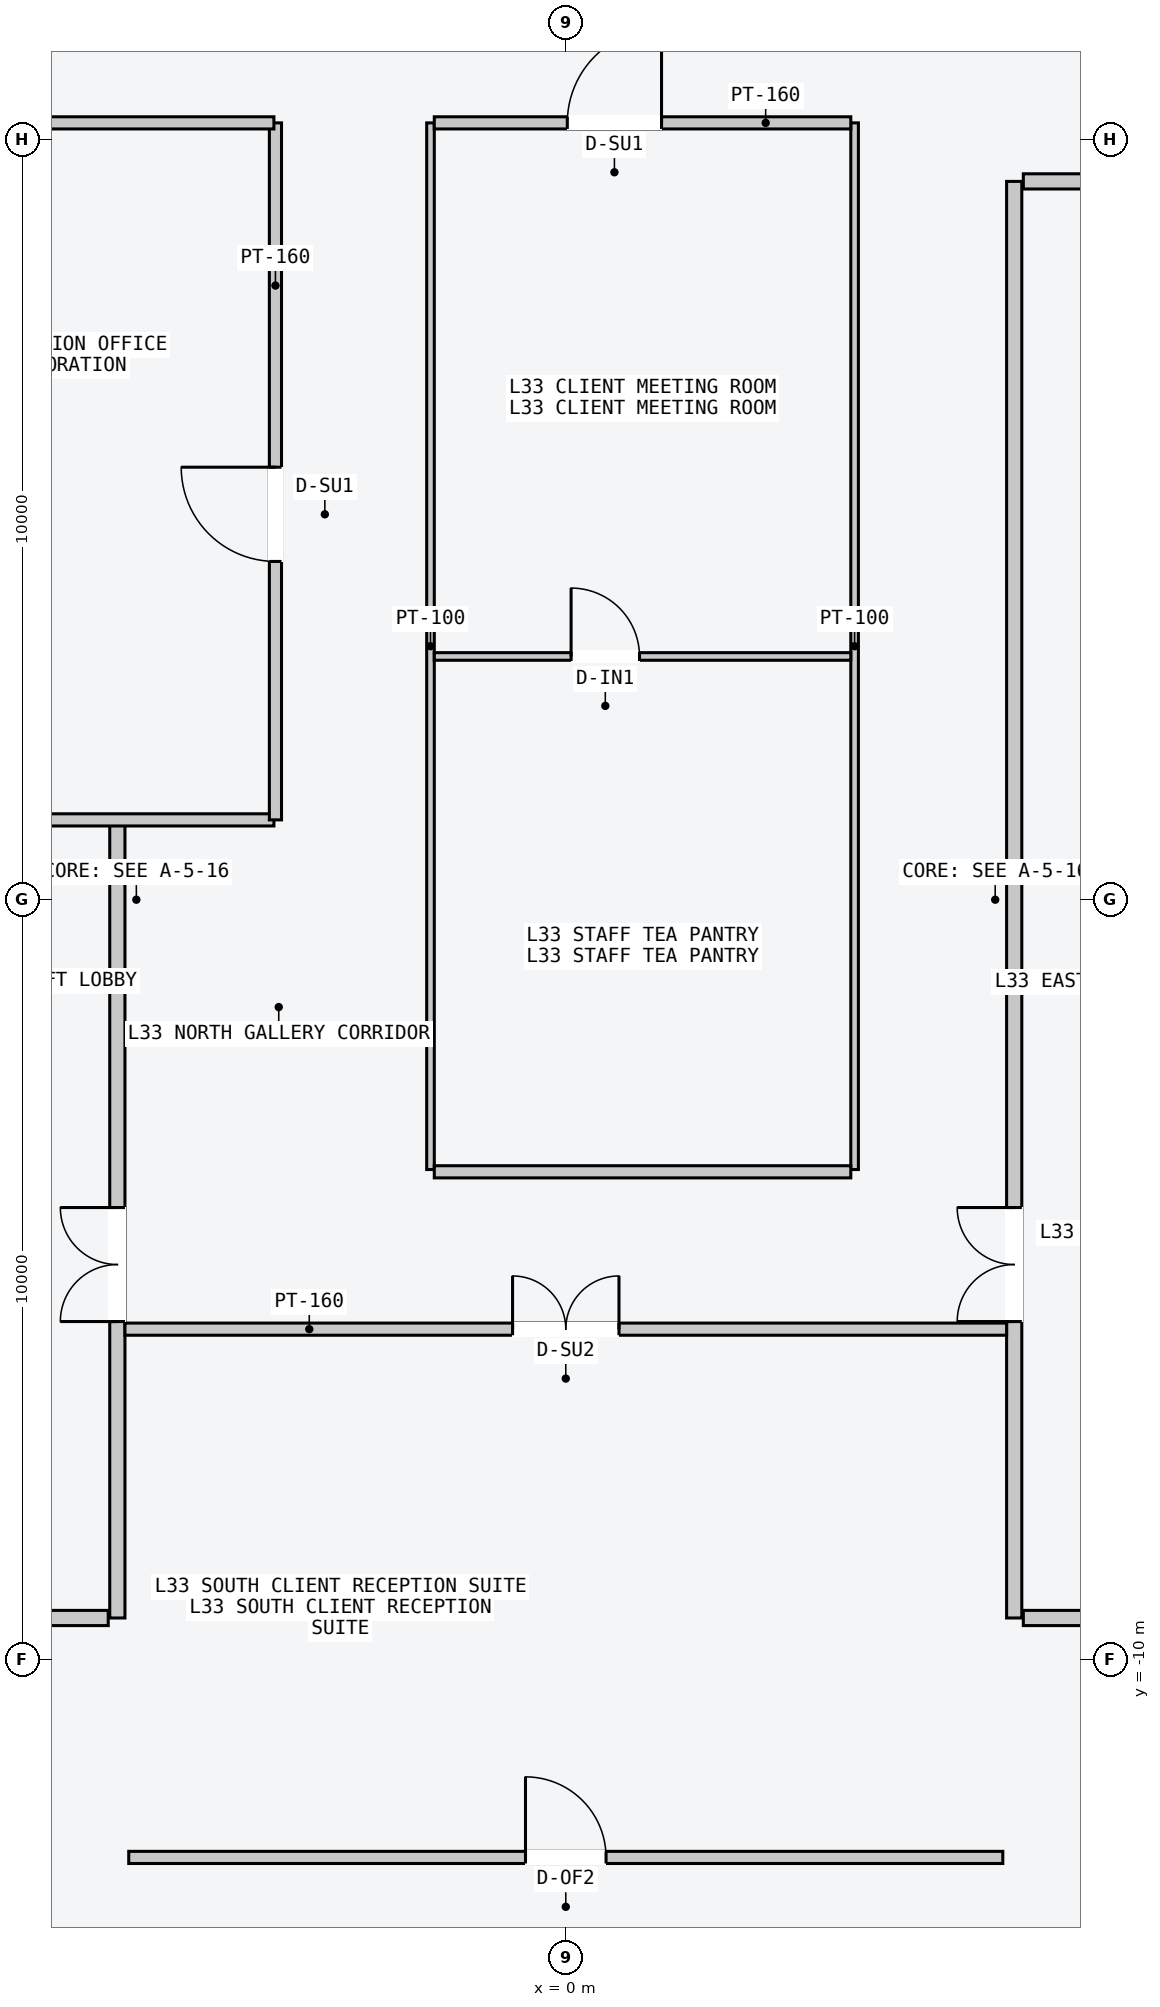
"""IFC4 building model, lengths in metres.
Left out: names, types, materials, properties, quantities, classifications, styles, units other than length and angle.
Written with IfcOpenShell. Run it as: python <this file> out.ifc"""

import sys

from ifc_helpers import new_model, si_unit, direction, frame, frame_2d, origin, place, context, subcontext, project, spatial, rectangle, extrude, element, fill, save


model = new_model("IFC4")
c1 = context("Model", 3, precision=1e-05, world=origin(), true_north=direction((0.0, 1.0)))
c2 = subcontext(c1, "Body", "Model", "MODEL_VIEW")
j1 = project(units=[si_unit("LENGTHUNIT", "METRE"), si_unit("PLANEANGLEUNIT", "RADIAN")], contexts=[c1])
p1 = place(None, origin())
s1 = spatial("IfcSite", under=j1, at=p1, CompositionType="ELEMENT")
p2 = place(p1, origin())
s2 = spatial("IfcBuilding", under=s1, at=p2, CompositionType="ELEMENT")
p3 = place(p2, frame((0.0, 0.0, 127.8)))
s3 = spatial("IfcBuildingStorey", under=s2, at=p3, CompositionType="ELEMENT", Elevation=127.8)
p4 = place(p3, frame((-5.9, -9.45, 0.0), z_axis=(0.0, 0.0, 1.0), x_axis=(0.0, 1.0, 0.0)))
e1 = element("IfcWall", 1, at=p4, inside=s3, PredefinedType="PARTITIONING", context=c2, shape_type="SweptSolid", body=[
    extrude(rectangle(XDim=10.5, YDim=0.2, at=frame_2d((5.25, 0.0))), origin(), (0.0, 0.0, 1.0), 3.4),
])
p5 = place(p4, frame((3.9, 0.0, 0.0)))
e2 = element("IfcOpeningElement", 2, at=p5, cuts=e1, PredefinedType="OPENING", context=c2, shape_type="SweptSolid", body=[
    extrude(rectangle(XDim=1.5, YDim=2.2, at=frame_2d((0.75, 1.1))), frame((0.0, 0.11, 0.0), z_axis=(0.0, -1.0, 0.0), x_axis=(1.0, 0.0, 0.0)), (0.0, 0.0, 1.0), 0.22),
])
p6 = place(p3, frame((-6.02, -9.45, 0.0), z_axis=(0.0, 0.0, 1.0), x_axis=(-1.0, 0.0, 0.0)))
e3 = element("IfcWall", 3, at=p6, inside=s3, PredefinedType="PARTITIONING", context=c2, shape_type="SweptSolid", body=[
    extrude(rectangle(XDim=1.8, YDim=0.2, at=frame_2d((0.9, 0.0))), origin(), (0.0, 0.0, 1.0), 3.4),
])
p7 = place(p3, frame((5.9, -9.45, 0.0), z_axis=(0.0, 0.0, 1.0), x_axis=(0.0, 1.0, 0.0)))
e4 = element("IfcWall", 4, at=p7, inside=s3, PredefinedType="PARTITIONING", context=c2, shape_type="SweptSolid", body=[
    extrude(rectangle(XDim=18.9, YDim=0.2, at=frame_2d((9.45, 0.0))), origin(), (0.0, 0.0, 1.0), 3.4),
])
p8 = place(p7, frame((3.9, 0.0, 0.0)))
e5 = element("IfcOpeningElement", 5, at=p8, cuts=e4, PredefinedType="OPENING", context=c2, shape_type="SweptSolid", body=[
    extrude(rectangle(XDim=1.5, YDim=2.2, at=frame_2d((0.75, 1.1))), frame((0.0, 0.11, 0.0), z_axis=(0.0, -1.0, 0.0), x_axis=(1.0, 0.0, 0.0)), (0.0, 0.0, 1.0), 0.22),
])
for number, where, z_axis, x_axis in (
    (6, (6.02, -9.45, 0.0), (0.0, 0.0, 1.0), (1.0, 0.0, 0.0)),
    (7, (6.02, 9.45, 0.0), (0.0, 0.0, 1.0), (1.0, 0.0, 0.0)),
):
    element("IfcWall", number, at=place(p3, frame(where, z_axis=z_axis, x_axis=x_axis)), inside=s3, PredefinedType="PARTITIONING", context=c2, shape_type="SweptSolid", body=[
        extrude(rectangle(XDim=1.8, YDim=0.2, at=frame_2d((0.9, 0.0))), origin(), (0.0, 0.0, 1.0), 3.4),
    ])
p9 = place(p3, frame((-10.05, 1.05, 0.0), z_axis=(0.0, 0.0, 1.0), x_axis=(1.0, 0.0, 0.0)))
e8 = element("IfcWall", 8, at=p9, inside=s3, PredefinedType="PARTITIONING", context=c2, shape_type="SweptSolid", body=[
    extrude(rectangle(XDim=6.21, YDim=0.16, at=frame_2d((3.105, 0.0))), origin(), (0.0, 0.0, 1.0), 3.4),
])
p10 = place(p3, frame((-3.82, 1.05, 0.0), z_axis=(0.0, 0.0, 1.0), x_axis=(0.0, 1.0, 0.0)))
e9 = element("IfcWall", 9, at=p10, inside=s3, PredefinedType="PARTITIONING", context=c2, shape_type="SweptSolid", body=[
    extrude(rectangle(XDim=9.17, YDim=0.16, at=frame_2d((4.585, 0.0))), origin(), (0.0, 0.0, 1.0), 3.4),
])
p11 = place(p10, frame((3.4, 0.0, 0.0)))
e10 = element("IfcOpeningElement", 10, at=p11, cuts=e9, PredefinedType="OPENING", context=c2, shape_type="SweptSolid", body=[
    extrude(rectangle(XDim=1.24, YDim=2.24, at=frame_2d((0.62, 1.12))), frame((0.0, 0.09, 0.0), z_axis=(0.0, -1.0, 0.0), x_axis=(1.0, 0.0, 0.0)), (0.0, 0.0, 1.0), 0.18),
])
p12 = place(p3, frame((-7.5, 10.22, 0.0), z_axis=(0.0, 0.0, 1.0), x_axis=(1.0, 0.0, 0.0)))
e11 = element("IfcWall", 11, at=p12, inside=s3, PredefinedType="PARTITIONING", context=c2, shape_type="SweptSolid", body=[
    extrude(rectangle(XDim=3.66, YDim=0.16, at=frame_2d((1.83, 0.0))), origin(), (0.0, 0.0, 1.0), 3.4),
])
for number, where, z_axis, x_axis in (
    (12, (-1.78, -3.55, 0.0), (0.0, 0.0, 1.0), (0.0, 1.0, 0.0)),
    (13, (3.8, -3.55, 0.0), (0.0, 0.0, 1.0), (0.0, 1.0, 0.0)),
):
    element("IfcWall", number, at=place(p3, frame(where, z_axis=z_axis, x_axis=x_axis)), inside=s3, PredefinedType="PARTITIONING", context=c2, shape_type="SweptSolid", body=[
        extrude(rectangle(XDim=13.77, YDim=0.1, at=frame_2d((6.885, 0.0))), origin(), (0.0, 0.0, 1.0), 3.4),
    ])
p13 = place(p3, frame((-1.73, -3.58, 0.0), z_axis=(0.0, 0.0, 1.0), x_axis=(1.0, 0.0, 0.0)))
e14 = element("IfcWall", 14, at=p13, inside=s3, PredefinedType="PARTITIONING", context=c2, shape_type="SweptSolid", body=[
    extrude(rectangle(XDim=5.48, YDim=0.16, at=frame_2d((2.74, 0.0))), origin(), (0.0, 0.0, 1.0), 3.4),
])
p14 = place(p3, frame((-1.73, 3.2, 0.0), z_axis=(0.0, 0.0, 1.0), x_axis=(1.0, 0.0, 0.0)))
e15 = element("IfcWall", 15, at=p14, inside=s3, PredefinedType="PARTITIONING", context=c2, shape_type="SweptSolid", body=[
    extrude(rectangle(XDim=5.48, YDim=0.1, at=frame_2d((2.74, 0.0))), origin(), (0.0, 0.0, 1.0), 3.4),
])
p15 = place(p14, frame((1.8, 0.0, 0.0)))
e16 = element("IfcOpeningElement", 16, at=p15, cuts=e15, PredefinedType="OPENING", context=c2, shape_type="SweptSolid", body=[
    extrude(rectangle(XDim=0.9, YDim=2.15, at=frame_2d((0.45, 1.075))), frame((0.0, 0.06, 0.0), z_axis=(0.0, -1.0, 0.0), x_axis=(1.0, 0.0, 0.0)), (0.0, 0.0, 1.0), 0.12),
])
p16 = place(p3, frame((-1.73, 10.22, 0.0), z_axis=(0.0, 0.0, 1.0), x_axis=(1.0, 0.0, 0.0)))
e17 = element("IfcWall", 17, at=p16, inside=s3, PredefinedType="PARTITIONING", context=c2, shape_type="SweptSolid", body=[
    extrude(rectangle(XDim=5.48, YDim=0.16, at=frame_2d((2.74, 0.0))), origin(), (0.0, 0.0, 1.0), 3.4),
])
p17 = place(p16, frame((1.75, 0.0, 0.0)))
e18 = element("IfcOpeningElement", 18, at=p17, cuts=e17, PredefinedType="OPENING", context=c2, shape_type="SweptSolid", body=[
    extrude(rectangle(XDim=1.24, YDim=2.24, at=frame_2d((0.62, 1.12))), frame((0.0, 0.09, 0.0), z_axis=(0.0, -1.0, 0.0), x_axis=(1.0, 0.0, 0.0)), (0.0, 0.0, 1.0), 0.18),
])
p18 = place(p3, frame((-5.8, -5.65, 0.0), z_axis=(0.0, 0.0, 1.0), x_axis=(1.0, 0.0, 0.0)))
e19 = element("IfcWall", 19, at=p18, inside=s3, PredefinedType="PARTITIONING", context=c2, shape_type="SweptSolid", body=[
    extrude(rectangle(XDim=11.6, YDim=0.16, at=frame_2d((5.8, 0.0))), origin(), (0.0, 0.0, 1.0), 3.4),
])
p19 = place(p18, frame((5.1, 0.0, 0.0)))
e20 = element("IfcOpeningElement", 20, at=p19, cuts=e19, PredefinedType="OPENING", context=c2, shape_type="SweptSolid", body=[
    extrude(rectangle(XDim=1.4, YDim=2.2, at=frame_2d((0.7, 1.1))), frame((0.0, 0.09, 0.0), z_axis=(0.0, -1.0, 0.0), x_axis=(1.0, 0.0, 0.0)), (0.0, 0.0, 1.0), 0.18),
])
p20 = place(p3, frame((-5.75, -12.6, 0.0), z_axis=(0.0, 0.0, 1.0), x_axis=(1.0, 0.0, 0.0)))
e21 = element("IfcWall", 21, at=p20, inside=s3, PredefinedType="PARTITIONING", context=c2, shape_type="SweptSolid", body=[
    extrude(rectangle(XDim=11.5, YDim=0.16, at=frame_2d((5.75, 0.0))), origin(), (0.0, 0.0, 1.0), 3.4),
])
p21 = place(p20, frame((5.22, 0.0, 0.0)))
e22 = element("IfcOpeningElement", 22, at=p21, cuts=e21, PredefinedType="OPENING", context=c2, shape_type="SweptSolid", body=[
    extrude(rectangle(XDim=1.06, YDim=2.2, at=frame_2d((0.53, 1.1))), frame((0.0, 0.09, 0.0), z_axis=(0.0, -1.0, 0.0), x_axis=(1.0, 0.0, 0.0)), (0.0, 0.0, 1.0), 0.18),
])
p22 = place(p5, origin())
e23 = element("IfcDoor", 23, at=p22, inside=s3, OperationType="DOUBLE_DOOR_SINGLE_SWING", PredefinedType="DOOR", context=c2, shape_type="SweptSolid", body=[
    extrude(rectangle(XDim=1.5, YDim=2.2, at=frame_2d((0.75, 1.1))), frame((0.0, 0.025, 0.0), z_axis=(0.0, -1.0, 0.0), x_axis=(1.0, 0.0, 0.0)), (0.0, 0.0, 1.0), 0.05),
])
fill(e2, e23)
p23 = place(p8, origin())
e24 = element("IfcDoor", 24, at=p23, inside=s3, OperationType="DOUBLE_DOOR_SINGLE_SWING", PredefinedType="DOOR", context=c2, shape_type="SweptSolid", body=[
    extrude(rectangle(XDim=1.5, YDim=2.2, at=frame_2d((0.75, 1.1))), frame((0.0, 0.025, 0.0), z_axis=(0.0, -1.0, 0.0), x_axis=(1.0, 0.0, 0.0)), (0.0, 0.0, 1.0), 0.05),
])
fill(e5, e24)
p24 = place(p11, origin())
e25 = element("IfcDoor", 25, at=p24, inside=s3, OperationType="SINGLE_SWING_RIGHT", PredefinedType="DOOR", context=c2, shape_type="SweptSolid", body=[
    extrude(rectangle(XDim=1.24, YDim=2.24, at=frame_2d((0.62, 1.12))), frame((0.0, 0.025, 0.0), z_axis=(0.0, -1.0, 0.0), x_axis=(1.0, 0.0, 0.0)), (0.0, 0.0, 1.0), 0.05),
])
fill(e10, e25)
p25 = place(p15, origin())
e26 = element("IfcDoor", 26, at=p25, inside=s3, OperationType="SINGLE_SWING_LEFT", PredefinedType="DOOR", context=c2, shape_type="SweptSolid", body=[
    extrude(rectangle(XDim=0.9, YDim=2.15, at=frame_2d((0.45, 1.075))), frame((0.0, 0.025, 0.0), z_axis=(0.0, -1.0, 0.0), x_axis=(1.0, 0.0, 0.0)), (0.0, 0.0, 1.0), 0.05),
])
fill(e16, e26)
p26 = place(p17, origin())
e27 = element("IfcDoor", 27, at=p26, inside=s3, OperationType="SINGLE_SWING_RIGHT", PredefinedType="DOOR", context=c2, shape_type="SweptSolid", body=[
    extrude(rectangle(XDim=1.24, YDim=2.24, at=frame_2d((0.62, 1.12))), frame((0.0, 0.025, 0.0), z_axis=(0.0, -1.0, 0.0), x_axis=(1.0, 0.0, 0.0)), (0.0, 0.0, 1.0), 0.05),
])
fill(e18, e27)
p27 = place(p19, origin())
e28 = element("IfcDoor", 28, at=p27, inside=s3, OperationType="DOUBLE_DOOR_SINGLE_SWING", PredefinedType="DOOR", context=c2, shape_type="SweptSolid", body=[
    extrude(rectangle(XDim=1.4, YDim=2.2, at=frame_2d((0.7, 1.1))), frame((0.0, 0.025, 0.0), z_axis=(0.0, -1.0, 0.0), x_axis=(1.0, 0.0, 0.0)), (0.0, 0.0, 1.0), 0.05),
])
fill(e20, e28)
p28 = place(p21, origin())
e29 = element("IfcDoor", 29, at=p28, inside=s3, OperationType="SINGLE_SWING_LEFT", PredefinedType="DOOR", context=c2, shape_type="SweptSolid", body=[
    extrude(rectangle(XDim=1.06, YDim=2.2, at=frame_2d((0.53, 1.1))), frame((0.0, 0.025, 0.0), z_axis=(0.0, -1.0, 0.0), x_axis=(1.0, 0.0, 0.0)), (0.0, 0.0, 1.0), 0.05),
])
fill(e22, e29)
save(model, sys.argv[1])
